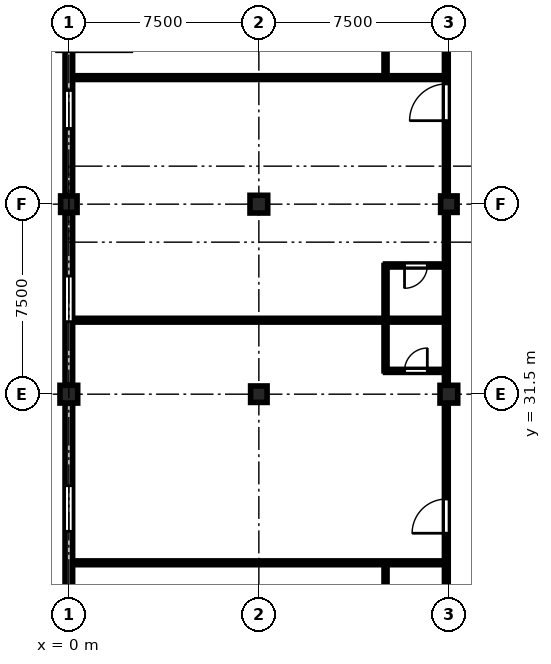
"""IFC4 building model, lengths in metres.
Left out: names, types, materials, properties, quantities, classifications, styles, units other than length and angle.
Written with IfcOpenShell. Run it as: python <this file> out.ifc"""

import sys

from ifc_helpers import new_model, si_unit, direction, frame, frame_2d, origin, origin_2d, place, context, subcontext, project, spatial, rectangle, extrude, element, fill, save


model = new_model("IFC4")
c1 = context("Model", 3, precision=1e-05, world=origin(), true_north=direction((0.0, 1.0)))
c2 = subcontext(c1, "Body", "Model", "MODEL_VIEW")
j1 = project(units=[si_unit("LENGTHUNIT", "METRE"), si_unit("PLANEANGLEUNIT", "RADIAN")], contexts=[c1])
p1 = place(None, origin())
s1 = spatial("IfcSite", under=j1, at=p1, CompositionType="ELEMENT")
p2 = place(p1, origin())
s2 = spatial("IfcBuilding", under=s1, at=p2, CompositionType="ELEMENT")
p3 = place(p2, frame((0.0, 0.0, 17.85)))
s3 = spatial("IfcBuildingStorey", under=s2, at=p3, CompositionType="ELEMENT", Elevation=17.85)
p4 = place(p3, frame((0.0, 31.5, 0.0), z_axis=(0.0, 0.0, 1.0), x_axis=(1.0, 0.0, 0.0)))
e1 = element("IfcColumn", 1, at=p4, inside=s3, PredefinedType="COLUMN", context=c2, shape_type="SweptSolid", body=[
    extrude(rectangle(XDim=0.7, YDim=0.7, at=origin_2d()), origin(), (0.0, 0.0, 1.0), 4.05),
])
for number, where, z_axis, x_axis in (
    (2, (0.0, 39.0, 0.0), (0.0, 0.0, 1.0), (1.0, 0.0, 0.0)),
    (3, (7.5, 31.5, 0.0), (0.0, 0.0, 1.0), (1.0, 0.0, 0.0)),
):
    element("IfcColumn", number, at=place(p3, frame(where, z_axis=z_axis, x_axis=x_axis)), inside=s3, PredefinedType="COLUMN", context=c2, shape_type="SweptSolid", body=[
        extrude(rectangle(XDim=0.65, YDim=0.65, at=origin_2d()), origin(), (0.0, 0.0, 1.0), 4.05),
    ])
for number, where, z_axis, x_axis in (
    (4, (7.5, 39.0, 0.0), (0.0, 0.0, 1.0), (1.0, 0.0, 0.0)),
    (5, (15.0, 31.5, 0.0), (0.0, 0.0, 1.0), (1.0, 0.0, 0.0)),
):
    element("IfcColumn", number, at=place(p3, frame(where, z_axis=z_axis, x_axis=x_axis)), inside=s3, PredefinedType="COLUMN", context=c2, shape_type="SweptSolid", body=[
        extrude(rectangle(XDim=0.7, YDim=0.7, at=origin_2d()), origin(), (0.0, 0.0, 1.0), 4.05),
    ])
p5 = place(p3, frame((15.0, 39.0, 0.0), z_axis=(0.0, 0.0, 1.0), x_axis=(1.0, 0.0, 0.0)))
e6 = element("IfcColumn", 6, at=p5, inside=s3, PredefinedType="COLUMN", context=c2, shape_type="SweptSolid", body=[
    extrude(rectangle(XDim=0.65, YDim=0.65, at=origin_2d()), origin(), (0.0, 0.0, 1.0), 4.05),
])
p6 = place(p3, frame((0.0, 22.835, 0.0), z_axis=(0.0, 0.0, 1.0), x_axis=(0.0, 1.0, 0.0)))
e7 = element("IfcWall", 7, at=p6, inside=s3, PredefinedType="STANDARD", context=c2, shape_type="SweptSolid", body=[
    extrude(rectangle(XDim=8.305, YDim=0.3, at=frame_2d((4.152, 0.0))), origin(), (0.0, 0.0, 1.0), 3.22),
])
p7 = place(p6, frame((3.252, 0.0, 0.9)))
e8 = element("IfcOpeningElement", 8, at=p7, cuts=e7, PredefinedType="OPENING", context=c2, shape_type="SweptSolid", body=[
    extrude(rectangle(XDim=1.8, YDim=1.8, at=frame_2d((0.9, 0.9))), frame((0.0, 0.16, 0.0), z_axis=(0.0, -1.0, 0.0), x_axis=(1.0, 0.0, 0.0)), (0.0, 0.0, 1.0), 0.32),
])
p8 = place(p3, frame((0.0, 31.86, 0.0), z_axis=(0.0, 0.0, 1.0), x_axis=(0.0, 1.0, 0.0)))
e9 = element("IfcWall", 9, at=p8, inside=s3, PredefinedType="STANDARD", context=c2, shape_type="SweptSolid", body=[
    extrude(rectangle(XDim=6.805, YDim=0.3, at=frame_2d((3.402, 0.0))), origin(), (0.0, 0.0, 1.0), 3.17),
])
p9 = place(p8, frame((2.502, 0.0, 0.9)))
e10 = element("IfcOpeningElement", 10, at=p9, cuts=e9, PredefinedType="OPENING", context=c2, shape_type="SweptSolid", body=[
    extrude(rectangle(XDim=1.8, YDim=1.99, at=frame_2d((0.9, 0.995))), frame((0.0, 0.16, 0.0), z_axis=(0.0, -1.0, 0.0), x_axis=(1.0, 0.0, 0.0)), (0.0, 0.0, 1.0), 0.32),
])
p10 = place(p3, frame((0.0, 39.335, 0.0), z_axis=(0.0, 0.0, 1.0), x_axis=(0.0, 1.0, 0.0)))
e11 = element("IfcWall", 11, at=p10, inside=s3, PredefinedType="STANDARD", context=c2, shape_type="SweptSolid", body=[
    extrude(rectangle(XDim=6.805, YDim=0.3, at=frame_2d((3.402, 0.0))), origin(), (0.0, 0.0, 1.0), 3.17),
])
p11 = place(p10, frame((2.653, 0.0, 0.9)))
e12 = element("IfcOpeningElement", 12, at=p11, cuts=e11, PredefinedType="OPENING", context=c2, shape_type="SweptSolid", body=[
    extrude(rectangle(XDim=1.5, YDim=1.99, at=frame_2d((0.75, 0.995))), frame((0.0, 0.16, 0.0), z_axis=(0.0, -1.0, 0.0), x_axis=(1.0, 0.0, 0.0)), (0.0, 0.0, 1.0), 0.32),
])
p12 = place(p3, frame((14.9, 15.43, 0.0), z_axis=(0.0, 0.0, 1.0), x_axis=(0.0, 1.0, 0.0)))
e13 = element("IfcWall", 13, at=p12, inside=s3, PredefinedType="PARTITIONING", context=c2, shape_type="SweptSolid", body=[
    extrude(rectangle(XDim=9.415, YDim=0.15, at=frame_2d((4.708, 0.0))), origin(), (0.0, 0.0, 1.0), 3.055),
])
p13 = place(p12, frame((2.49, 0.0, 0.0)))
e14 = element("IfcOpeningElement", 14, at=p13, cuts=e13, PredefinedType="OPENING", context=c2, shape_type="SweptSolid", body=[
    extrude(rectangle(XDim=1.45, YDim=2.3, at=frame_2d((0.725, 1.15))), frame((0.0, 0.085, 0.0), z_axis=(0.0, -1.0, 0.0), x_axis=(1.0, 0.0, 0.0)), (0.0, 0.0, 1.0), 0.17),
])
p14 = place(p3, frame((12.5, 22.845, 0.0), z_axis=(0.0, 0.0, 1.0), x_axis=(0.0, 1.0, 0.0)))
e15 = element("IfcWall", 15, at=p14, inside=s3, PredefinedType="PARTITIONING", context=c2, shape_type="SweptSolid", body=[
    extrude(rectangle(XDim=2.0, YDim=0.12, at=frame_2d((1.0, 0.0))), origin(), (0.0, 0.0, 1.0), 3.755),
])
p15 = place(p3, frame((14.9, 25.005, 0.0), z_axis=(0.0, 0.0, 1.0), x_axis=(0.0, 1.0, 0.0)))
e16 = element("IfcWall", 16, at=p15, inside=s3, PredefinedType="PARTITIONING", context=c2, shape_type="SweptSolid", body=[
    extrude(rectangle(XDim=9.415, YDim=0.15, at=frame_2d((4.708, 0.0))), origin(), (0.0, 0.0, 1.0), 3.055),
])
p16 = place(p15, frame((1.007, 0.0, 0.0)))
e17 = element("IfcOpeningElement", 17, at=p16, cuts=e16, PredefinedType="OPENING", context=c2, shape_type="SweptSolid", body=[
    extrude(rectangle(XDim=1.35, YDim=2.25, at=frame_2d((0.675, 1.125))), frame((0.0, 0.085, 0.0), z_axis=(0.0, -1.0, 0.0), x_axis=(1.0, 0.0, 0.0)), (0.0, 0.0, 1.0), 0.17),
])
p17 = place(p3, frame((12.5, 32.42, 0.0), z_axis=(0.0, 0.0, 1.0), x_axis=(1.0, 0.0, 0.0)))
e18 = element("IfcWall", 18, at=p17, inside=s3, PredefinedType="PARTITIONING", context=c2, shape_type="SweptSolid", body=[
    extrude(rectangle(XDim=2.4, YDim=0.12, at=frame_2d((1.2, 0.0))), origin(), (0.0, 0.0, 1.0), 3.755),
])
p18 = place(p17, frame((0.75, 0.0, 0.0)))
e19 = element("IfcOpeningElement", 19, at=p18, cuts=e18, PredefinedType="OPENING", context=c2, shape_type="SweptSolid", body=[
    extrude(rectangle(XDim=0.9, YDim=2.1, at=frame_2d((0.45, 1.05))), frame((0.0, 0.07, 0.0), z_axis=(0.0, -1.0, 0.0), x_axis=(1.0, 0.0, 0.0)), (0.0, 0.0, 1.0), 0.14),
])
p19 = place(p3, frame((12.5, 32.42, 0.0), z_axis=(0.0, 0.0, 1.0), x_axis=(0.0, 1.0, 0.0)))
e20 = element("IfcWall", 20, at=p19, inside=s3, PredefinedType="PARTITIONING", context=c2, shape_type="SweptSolid", body=[
    extrude(rectangle(XDim=2.0, YDim=0.12, at=frame_2d((1.0, 0.0))), origin(), (0.0, 0.0, 1.0), 3.755),
])
p20 = place(p3, frame((14.9, 34.58, 0.0), z_axis=(0.0, 0.0, 1.0), x_axis=(0.0, 1.0, 0.0)))
e21 = element("IfcWall", 21, at=p20, inside=s3, PredefinedType="PARTITIONING", context=c2, shape_type="SweptSolid", body=[
    extrude(rectangle(XDim=9.415, YDim=0.15, at=frame_2d((4.708, 0.0))), origin(), (0.0, 0.0, 1.0), 3.205),
])
p21 = place(p20, frame((7.715, 0.0, 0.0)))
e22 = element("IfcOpeningElement", 22, at=p21, cuts=e21, PredefinedType="OPENING", context=c2, shape_type="SweptSolid", body=[
    extrude(rectangle(XDim=1.45, YDim=2.3, at=frame_2d((0.725, 1.15))), frame((0.0, 0.085, 0.0), z_axis=(0.0, -1.0, 0.0), x_axis=(1.0, 0.0, 0.0)), (0.0, 0.0, 1.0), 0.17),
])
p22 = place(p3, frame((14.9, 36.58, 0.0), z_axis=(0.0, 0.0, 1.0), x_axis=(-1.0, 0.0, 0.0)))
e23 = element("IfcWall", 23, at=p22, inside=s3, PredefinedType="PARTITIONING", context=c2, shape_type="SweptSolid", body=[
    extrude(rectangle(XDim=2.4, YDim=0.12, at=frame_2d((1.2, 0.0))), origin(), (0.0, 0.0, 1.0), 3.755),
])
p23 = place(p22, frame((0.75, 0.0, 0.0)))
e24 = element("IfcOpeningElement", 24, at=p23, cuts=e23, PredefinedType="OPENING", context=c2, shape_type="SweptSolid", body=[
    extrude(rectangle(XDim=0.9, YDim=2.1, at=frame_2d((0.45, 1.05))), frame((0.0, 0.07, 0.0), z_axis=(0.0, -1.0, 0.0), x_axis=(1.0, 0.0, 0.0)), (0.0, 0.0, 1.0), 0.14),
])
p24 = place(p3, frame((12.5, 34.58, 0.0), z_axis=(0.0, 0.0, 1.0), x_axis=(0.0, 1.0, 0.0)))
e25 = element("IfcWall", 25, at=p24, inside=s3, PredefinedType="PARTITIONING", context=c2, shape_type="SweptSolid", body=[
    extrude(rectangle(XDim=2.0, YDim=0.12, at=frame_2d((1.0, 0.0))), origin(), (0.0, 0.0, 1.0), 3.755),
])
p25 = place(p3, frame((14.9, 44.155, 0.0), z_axis=(0.0, 0.0, 1.0), x_axis=(0.0, 1.0, 0.0)))
e26 = element("IfcWall", 26, at=p25, inside=s3, PredefinedType="PARTITIONING", context=c2, shape_type="SweptSolid", body=[
    extrude(rectangle(XDim=9.415, YDim=0.15, at=frame_2d((4.708, 0.0))), origin(), (0.0, 0.0, 1.0), 3.205),
])
p26 = place(p25, frame((5.545, 0.0, 0.0)))
e27 = element("IfcOpeningElement", 27, at=p26, cuts=e26, PredefinedType="OPENING", context=c2, shape_type="SweptSolid", body=[
    extrude(rectangle(XDim=1.35, YDim=2.25, at=frame_2d((0.675, 1.125))), frame((0.0, 0.085, 0.0), z_axis=(0.0, -1.0, 0.0), x_axis=(1.0, 0.0, 0.0)), (0.0, 0.0, 1.0), 0.17),
])
p27 = place(p3, frame((12.5, 44.155, 0.0), z_axis=(0.0, 0.0, 1.0), x_axis=(0.0, 1.0, 0.0)))
e28 = element("IfcWall", 28, at=p27, inside=s3, PredefinedType="PARTITIONING", context=c2, shape_type="SweptSolid", body=[
    extrude(rectangle(XDim=2.0, YDim=0.12, at=frame_2d((1.0, 0.0))), origin(), (0.0, 0.0, 1.0), 3.755),
])
for number, where, z_axis, x_axis in (
    (29, (0.35, 24.845, 0.0), (0.0, 0.0, 1.0), (1.0, 0.0, 0.0)),
    (30, (0.35, 34.42, 0.0), (0.0, 0.0, 1.0), (1.0, 0.0, 0.0)),
    (31, (0.35, 43.995, 0.0), (0.0, 0.0, 1.0), (1.0, 0.0, 0.0)),
):
    element("IfcWall", number, at=place(p3, frame(where, z_axis=z_axis, x_axis=x_axis)), inside=s3, PredefinedType="PARTITIONING", context=c2, shape_type="SweptSolid", body=[
        extrude(rectangle(XDim=14.55, YDim=0.15, at=frame_2d((7.275, 0.0))), origin(), (0.0, 0.0, 1.0), 3.755),
    ])
p28 = place(p7, origin())
e32 = element("IfcWindow", 32, at=p28, inside=s3, PartitioningType="SINGLE_PANEL", PredefinedType="WINDOW", context=c2, shape_type="SweptSolid", body=[
    extrude(rectangle(XDim=1.8, YDim=1.8, at=frame_2d((0.9, 0.9))), frame((0.0, 0.03, 0.0), z_axis=(0.0, -1.0, 0.0), x_axis=(1.0, 0.0, 0.0)), (0.0, 0.0, 1.0), 0.06),
])
fill(e8, e32)
p29 = place(p9, origin())
e33 = element("IfcWindow", 33, at=p29, inside=s3, PartitioningType="SINGLE_PANEL", PredefinedType="WINDOW", context=c2, shape_type="SweptSolid", body=[
    extrude(rectangle(XDim=1.8, YDim=1.99, at=frame_2d((0.9, 0.995))), frame((0.0, 0.03, 0.0), z_axis=(0.0, -1.0, 0.0), x_axis=(1.0, 0.0, 0.0)), (0.0, 0.0, 1.0), 0.06),
])
fill(e10, e33)
p30 = place(p11, origin())
e34 = element("IfcWindow", 34, at=p30, inside=s3, PartitioningType="SINGLE_PANEL", PredefinedType="WINDOW", context=c2, shape_type="SweptSolid", body=[
    extrude(rectangle(XDim=1.5, YDim=1.99, at=frame_2d((0.75, 0.995))), frame((0.0, 0.03, 0.0), z_axis=(0.0, -1.0, 0.0), x_axis=(1.0, 0.0, 0.0)), (0.0, 0.0, 1.0), 0.06),
])
fill(e12, e34)
p31 = place(p16, origin())
e35 = element("IfcDoor", 35, at=p31, inside=s3, OperationType="SINGLE_SWING_LEFT", PredefinedType="DOOR", context=c2, shape_type="SweptSolid", body=[
    extrude(rectangle(XDim=1.35, YDim=2.25, at=frame_2d((0.675, 1.125))), frame((0.0, 0.025, 0.0), z_axis=(0.0, -1.0, 0.0), x_axis=(1.0, 0.0, 0.0)), (0.0, 0.0, 1.0), 0.05),
])
fill(e17, e35)
p32 = place(p18, origin())
e36 = element("IfcDoor", 36, at=p32, inside=s3, OperationType="SINGLE_SWING_RIGHT", PredefinedType="DOOR", context=c2, shape_type="SweptSolid", body=[
    extrude(rectangle(XDim=0.9, YDim=2.1, at=frame_2d((0.45, 1.05))), frame((0.0, 0.025, 0.0), z_axis=(0.0, -1.0, 0.0), x_axis=(1.0, 0.0, 0.0)), (0.0, 0.0, 1.0), 0.05),
])
fill(e19, e36)
p33 = place(p21, origin())
e37 = element("IfcDoor", 37, at=p33, inside=s3, OperationType="SINGLE_SWING_LEFT", PredefinedType="DOOR", context=c2, shape_type="SweptSolid", body=[
    extrude(rectangle(XDim=1.45, YDim=2.3, at=frame_2d((0.725, 1.15))), frame((0.0, 0.025, 0.0), z_axis=(0.0, -1.0, 0.0), x_axis=(1.0, 0.0, 0.0)), (0.0, 0.0, 1.0), 0.05),
])
fill(e22, e37)
p34 = place(p23, origin())
e38 = element("IfcDoor", 38, at=p34, inside=s3, OperationType="SINGLE_SWING_RIGHT", PredefinedType="DOOR", context=c2, shape_type="SweptSolid", body=[
    extrude(rectangle(XDim=0.9, YDim=2.1, at=frame_2d((0.45, 1.05))), frame((0.0, 0.025, 0.0), z_axis=(0.0, -1.0, 0.0), x_axis=(1.0, 0.0, 0.0)), (0.0, 0.0, 1.0), 0.05),
])
fill(e24, e38)
save(model, sys.argv[1])
